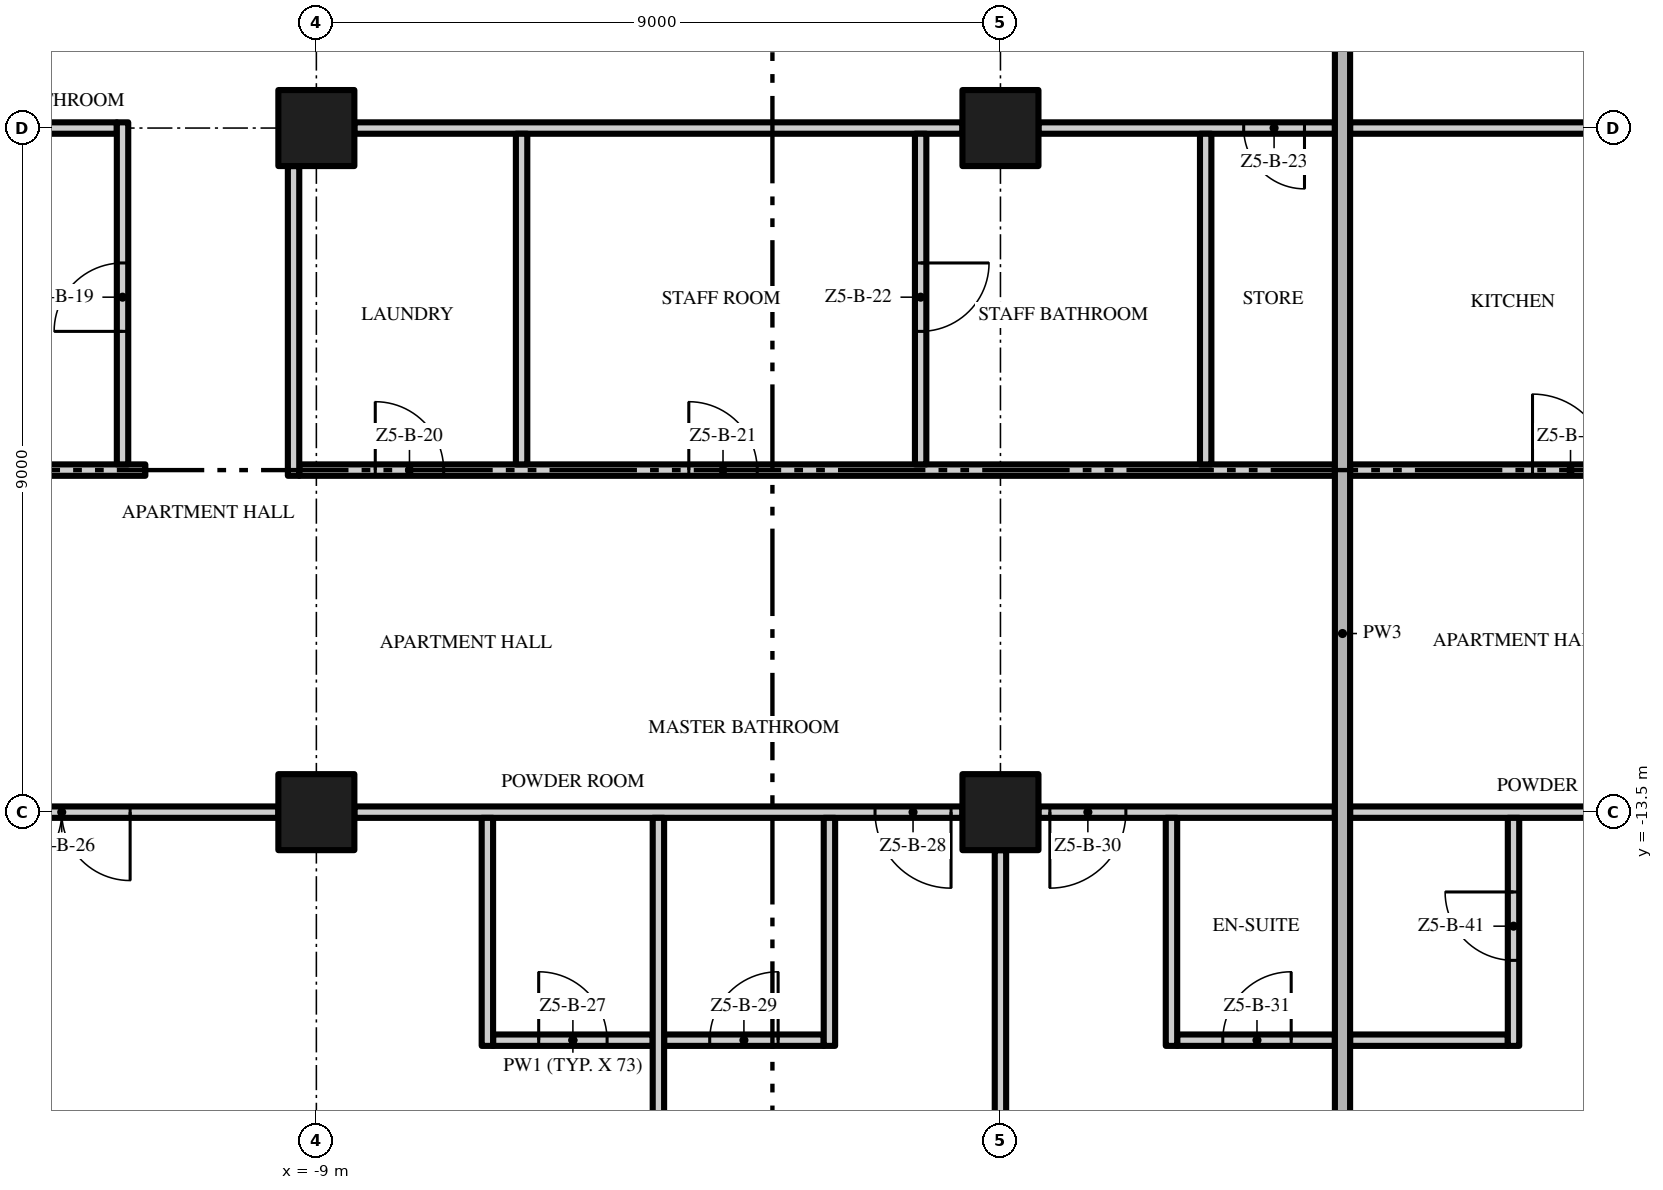
"""IFC4 building model, lengths in metres.
Left out: names, types, materials, properties, quantities, classifications, styles, units other than length and angle.
Written with IfcOpenShell. Run it as: python <this file> out.ifc"""

import sys

from ifc_helpers import new_model, si_unit, direction, frame, frame_2d, origin, origin_2d, place, context, subcontext, project, spatial, rectangle, extrude, element, fill, save


model = new_model("IFC4")
c1 = context("Model", 3, precision=1e-05, world=origin(), true_north=direction((0.0, 1.0)))
c2 = subcontext(c1, "Body", "Model", "MODEL_VIEW")
j1 = project(units=[si_unit("LENGTHUNIT", "METRE"), si_unit("PLANEANGLEUNIT", "RADIAN")], contexts=[c1])
p1 = place(None, origin())
s1 = spatial("IfcSite", under=j1, at=p1, CompositionType="ELEMENT")
p2 = place(p1, origin())
s2 = spatial("IfcBuilding", under=s1, at=p2, CompositionType="ELEMENT")
p3 = place(p2, frame((0.0, 0.0, 254.0)))
s3 = spatial("IfcBuildingStorey", under=s2, at=p3, CompositionType="ELEMENT", Elevation=254.0)
for number, where, z_axis, x_axis in (
    (1, (-9.0, -13.5, 0.0), (0.0, 0.0, 1.0), (1.0, 0.0, 0.0)),
    (2, (-9.0, -4.5, 0.0), (0.0, 0.0, 1.0), (1.0, 0.0, 0.0)),
    (3, (0.0, -13.5, 0.0), (0.0, 0.0, 1.0), (1.0, 0.0, 0.0)),
    (4, (0.0, -4.5, 0.0), (0.0, 0.0, 1.0), (1.0, 0.0, 0.0)),
):
    element("IfcColumn", number, at=place(p3, frame(where, z_axis=z_axis, x_axis=x_axis)), inside=s3, PredefinedType="COLUMN", context=c2, shape_type="SweptSolid", body=[
        extrude(rectangle(XDim=1.0, YDim=1.0, at=origin_2d()), origin(), (0.0, 0.0, 1.0), 3.5),
    ])
p4 = place(p3, frame((-6.675, -16.5, 0.0), z_axis=(0.0, 0.0, 1.0), x_axis=(1.0, 0.0, 0.0)))
e5 = element("IfcWall", 5, at=p4, inside=s3, PredefinedType="PARTITIONING", context=c2, shape_type="SweptSolid", body=[
    extrude(rectangle(XDim=2.1, YDim=0.15, at=frame_2d((1.05, 0.0))), origin(), (0.0, 0.0, 1.0), 3.5),
])
p5 = place(p4, frame((0.6, 0.0, 0.0)))
e6 = element("IfcOpeningElement", 6, at=p5, cuts=e5, PredefinedType="OPENING", context=c2, shape_type="SweptSolid", body=[
    extrude(rectangle(XDim=0.9, YDim=2.1, at=frame_2d((0.45, 1.05))), frame((0.0, 0.085, 0.0), z_axis=(0.0, -1.0, 0.0), x_axis=(1.0, 0.0, 0.0)), (0.0, 0.0, 1.0), 0.17),
])
p6 = place(p3, frame((-4.425, -16.5, 0.0), z_axis=(0.0, 0.0, 1.0), x_axis=(1.0, 0.0, 0.0)))
e7 = element("IfcWall", 7, at=p6, inside=s3, PredefinedType="PARTITIONING", context=c2, shape_type="SweptSolid", body=[
    extrude(rectangle(XDim=2.1, YDim=0.15, at=frame_2d((1.05, 0.0))), origin(), (0.0, 0.0, 1.0), 3.5),
])
p7 = place(p6, frame((0.6, 0.0, 0.0)))
e8 = element("IfcOpeningElement", 8, at=p7, cuts=e7, PredefinedType="OPENING", context=c2, shape_type="SweptSolid", body=[
    extrude(rectangle(XDim=0.9, YDim=2.1, at=frame_2d((0.45, 1.05))), frame((0.0, 0.085, 0.0), z_axis=(0.0, -1.0, 0.0), x_axis=(1.0, 0.0, 0.0)), (0.0, 0.0, 1.0), 0.17),
])
p8 = place(p3, frame((2.325, -16.5, 0.0), z_axis=(0.0, 0.0, 1.0), x_axis=(1.0, 0.0, 0.0)))
e9 = element("IfcWall", 9, at=p8, inside=s3, PredefinedType="PARTITIONING", context=c2, shape_type="SweptSolid", body=[
    extrude(rectangle(XDim=2.075, YDim=0.15, at=frame_2d((1.038, 0.0))), origin(), (0.0, 0.0, 1.0), 3.5),
])
p9 = place(p8, frame((0.6, 0.0, 0.0)))
e10 = element("IfcOpeningElement", 10, at=p9, cuts=e9, PredefinedType="OPENING", context=c2, shape_type="SweptSolid", body=[
    extrude(rectangle(XDim=0.9, YDim=2.1, at=frame_2d((0.45, 1.05))), frame((0.0, 0.085, 0.0), z_axis=(0.0, -1.0, 0.0), x_axis=(1.0, 0.0, 0.0)), (0.0, 0.0, 1.0), 0.17),
])
p10 = place(p3, frame((4.6, -16.5, 0.0), z_axis=(0.0, 0.0, 1.0), x_axis=(1.0, 0.0, 0.0)))
e11 = element("IfcWall", 11, at=p10, inside=s3, PredefinedType="PARTITIONING", context=c2, shape_type="SweptSolid", body=[
    extrude(rectangle(XDim=2.075, YDim=0.15, at=frame_2d((1.038, 0.0))), origin(), (0.0, 0.0, 1.0), 3.5),
])
p11 = place(p3, frame((-9.5, -13.5, 0.0), z_axis=(0.0, 0.0, 1.0), x_axis=(-1.0, 0.0, 0.0)))
e12 = element("IfcWall", 12, at=p11, inside=s3, PredefinedType="PARTITIONING", context=c2, shape_type="SweptSolid", body=[
    extrude(rectangle(XDim=8.0, YDim=0.15, at=frame_2d((4.0, 0.0))), origin(), (0.0, 0.0, 1.0), 3.5),
])
p12 = place(p11, frame((1.95, 0.0, 0.0)))
e13 = element("IfcOpeningElement", 13, at=p12, cuts=e12, PredefinedType="OPENING", context=c2, shape_type="SweptSolid", body=[
    extrude(rectangle(XDim=1.8, YDim=2.4, at=frame_2d((0.9, 1.2))), frame((0.0, 0.085, 0.0), z_axis=(0.0, -1.0, 0.0), x_axis=(1.0, 0.0, 0.0)), (0.0, 0.0, 1.0), 0.17),
])
p13 = place(p3, frame((-0.5, -13.5, 0.0), z_axis=(0.0, 0.0, 1.0), x_axis=(-1.0, 0.0, 0.0)))
e14 = element("IfcWall", 14, at=p13, inside=s3, PredefinedType="PARTITIONING", context=c2, shape_type="SweptSolid", body=[
    extrude(rectangle(XDim=8.0, YDim=0.15, at=frame_2d((4.0, 0.0))), origin(), (0.0, 0.0, 1.0), 3.5),
])
p14 = place(p13, frame((0.15, 0.0, 0.0)))
e15 = element("IfcOpeningElement", 15, at=p14, cuts=e14, PredefinedType="OPENING", context=c2, shape_type="SweptSolid", body=[
    extrude(rectangle(XDim=1.0, YDim=2.4, at=frame_2d((0.5, 1.2))), frame((0.0, 0.085, 0.0), z_axis=(0.0, -1.0, 0.0), x_axis=(1.0, 0.0, 0.0)), (0.0, 0.0, 1.0), 0.17),
])
p15 = place(p3, frame((4.4, -13.5, 0.0), z_axis=(0.0, 0.0, 1.0), x_axis=(-1.0, 0.0, 0.0)))
e16 = element("IfcWall", 16, at=p15, inside=s3, PredefinedType="PARTITIONING", context=c2, shape_type="SweptSolid", body=[
    extrude(rectangle(XDim=3.9, YDim=0.15, at=frame_2d((1.95, 0.0))), origin(), (0.0, 0.0, 1.0), 3.5),
])
p16 = place(p15, frame((2.75, 0.0, 0.0)))
e17 = element("IfcOpeningElement", 17, at=p16, cuts=e16, PredefinedType="OPENING", context=c2, shape_type="SweptSolid", body=[
    extrude(rectangle(XDim=1.0, YDim=2.4, at=frame_2d((0.5, 1.2))), frame((0.0, 0.085, 0.0), z_axis=(0.0, -1.0, 0.0), x_axis=(1.0, 0.0, 0.0)), (0.0, 0.0, 1.0), 0.17),
])
p17 = place(p3, frame((4.6, -13.5, 0.0), z_axis=(0.0, 0.0, 1.0), x_axis=(1.0, 0.0, 0.0)))
e18 = element("IfcWall", 18, at=p17, inside=s3, PredefinedType="PARTITIONING", context=c2, shape_type="SweptSolid", body=[
    extrude(rectangle(XDim=3.9, YDim=0.15, at=frame_2d((1.95, 0.0))), origin(), (0.0, 0.0, 1.0), 3.5),
])
p18 = place(p3, frame((-26.7, -9.0, 0.0), z_axis=(0.0, 0.0, 1.0), x_axis=(1.0, 0.0, 0.0)))
e19 = element("IfcWall", 19, at=p18, inside=s3, PredefinedType="PARTITIONING", context=c2, shape_type="SweptSolid", body=[
    extrude(rectangle(XDim=15.45, YDim=0.15, at=frame_2d((7.725, 0.0))), origin(), (0.0, 0.0, 1.0), 3.5),
])
p19 = place(p18, frame((9.4, 0.0, 0.0)))
e20 = element("IfcOpeningElement", 20, at=p19, cuts=e19, PredefinedType="OPENING", context=c2, shape_type="SweptSolid", body=[
    extrude(rectangle(XDim=1.0, YDim=2.4, at=frame_2d((0.5, 1.2))), frame((0.0, 0.085, 0.0), z_axis=(0.0, -1.0, 0.0), x_axis=(1.0, 0.0, 0.0)), (0.0, 0.0, 1.0), 0.17),
])
p20 = place(p3, frame((-9.225, -9.0, 0.0), z_axis=(0.0, 0.0, 1.0), x_axis=(1.0, 0.0, 0.0)))
e21 = element("IfcWall", 21, at=p20, inside=s3, PredefinedType="PARTITIONING", context=c2, shape_type="SweptSolid", body=[
    extrude(rectangle(XDim=13.625, YDim=0.15, at=frame_2d((6.812, 0.0))), origin(), (0.0, 0.0, 1.0), 3.5),
])
p21 = place(p20, frame((1.0, 0.0, 0.0)))
e22 = element("IfcOpeningElement", 22, at=p21, cuts=e21, PredefinedType="OPENING", context=c2, shape_type="SweptSolid", body=[
    extrude(rectangle(XDim=0.9, YDim=2.1, at=frame_2d((0.45, 1.05))), frame((0.0, 0.085, 0.0), z_axis=(0.0, -1.0, 0.0), x_axis=(1.0, 0.0, 0.0)), (0.0, 0.0, 1.0), 0.17),
])
p22 = place(p20, frame((5.125, 0.0, 0.0)))
e23 = element("IfcOpeningElement", 23, at=p22, cuts=e21, PredefinedType="OPENING", context=c2, shape_type="SweptSolid", body=[
    extrude(rectangle(XDim=0.9, YDim=2.1, at=frame_2d((0.45, 1.05))), frame((0.0, 0.085, 0.0), z_axis=(0.0, -1.0, 0.0), x_axis=(1.0, 0.0, 0.0)), (0.0, 0.0, 1.0), 0.17),
])
p23 = place(p3, frame((4.6, -9.0, 0.0), z_axis=(0.0, 0.0, 1.0), x_axis=(1.0, 0.0, 0.0)))
e24 = element("IfcWall", 24, at=p23, inside=s3, PredefinedType="PARTITIONING", context=c2, shape_type="SweptSolid", body=[
    extrude(rectangle(XDim=8.075, YDim=0.15, at=frame_2d((4.037, 0.0))), origin(), (0.0, 0.0, 1.0), 3.5),
])
p24 = place(p23, frame((2.4, 0.0, 0.0)))
e25 = element("IfcOpeningElement", 25, at=p24, cuts=e24, PredefinedType="OPENING", context=c2, shape_type="SweptSolid", body=[
    extrude(rectangle(XDim=1.0, YDim=2.4, at=frame_2d((0.5, 1.2))), frame((0.0, 0.085, 0.0), z_axis=(0.0, -1.0, 0.0), x_axis=(1.0, 0.0, 0.0)), (0.0, 0.0, 1.0), 0.17),
])
p25 = place(p3, frame((-17.5, -4.5, 0.0), z_axis=(0.0, 0.0, 1.0), x_axis=(1.0, 0.0, 0.0)))
e26 = element("IfcWall", 26, at=p25, inside=s3, PredefinedType="PARTITIONING", context=c2, shape_type="SweptSolid", body=[
    extrude(rectangle(XDim=5.875, YDim=0.15, at=frame_2d((2.938, 0.0))), origin(), (0.0, 0.0, 1.0), 3.5),
])
p26 = place(p3, frame((-8.5, -4.5, 0.0), z_axis=(0.0, 0.0, 1.0), x_axis=(1.0, 0.0, 0.0)))
e27 = element("IfcWall", 27, at=p26, inside=s3, PredefinedType="PARTITIONING", context=c2, shape_type="SweptSolid", body=[
    extrude(rectangle(XDim=8.0, YDim=0.15, at=frame_2d((4.0, 0.0))), origin(), (0.0, 0.0, 1.0), 3.5),
])
p27 = place(p3, frame((4.4, -4.5, 0.0), z_axis=(0.0, 0.0, 1.0), x_axis=(-1.0, 0.0, 0.0)))
e28 = element("IfcWall", 28, at=p27, inside=s3, PredefinedType="PARTITIONING", context=c2, shape_type="SweptSolid", body=[
    extrude(rectangle(XDim=3.9, YDim=0.15, at=frame_2d((1.95, 0.0))), origin(), (0.0, 0.0, 1.0), 3.5),
])
p28 = place(p27, frame((0.4, 0.0, 0.0)))
e29 = element("IfcOpeningElement", 29, at=p28, cuts=e28, PredefinedType="OPENING", context=c2, shape_type="SweptSolid", body=[
    extrude(rectangle(XDim=0.8, YDim=2.0, at=frame_2d((0.4, 1.0))), frame((0.0, 0.085, 0.0), z_axis=(0.0, -1.0, 0.0), x_axis=(1.0, 0.0, 0.0)), (0.0, 0.0, 1.0), 0.17),
])
p29 = place(p3, frame((4.6, -4.5, 0.0), z_axis=(0.0, 0.0, 1.0), x_axis=(1.0, 0.0, 0.0)))
e30 = element("IfcWall", 30, at=p29, inside=s3, PredefinedType="PARTITIONING", context=c2, shape_type="SweptSolid", body=[
    extrude(rectangle(XDim=3.9, YDim=0.15, at=frame_2d((1.95, 0.0))), origin(), (0.0, 0.0, 1.0), 3.5),
])
p30 = place(p3, frame((-11.55, -8.925, 0.0), z_axis=(0.0, 0.0, 1.0), x_axis=(0.0, 1.0, 0.0)))
e31 = element("IfcWall", 31, at=p30, inside=s3, PredefinedType="PARTITIONING", context=c2, shape_type="SweptSolid", body=[
    extrude(rectangle(XDim=4.5, YDim=0.15, at=frame_2d((2.25, 0.0))), origin(), (0.0, 0.0, 1.0), 3.5),
])
p31 = place(p30, frame((1.75, 0.0, 0.0)))
e32 = element("IfcOpeningElement", 32, at=p31, cuts=e31, PredefinedType="OPENING", context=c2, shape_type="SweptSolid", body=[
    extrude(rectangle(XDim=0.9, YDim=2.1, at=frame_2d((0.45, 1.05))), frame((0.0, 0.085, 0.0), z_axis=(0.0, -1.0, 0.0), x_axis=(1.0, 0.0, 0.0)), (0.0, 0.0, 1.0), 0.17),
])
p32 = place(p3, frame((-9.3, -9.075, 0.0), z_axis=(0.0, 0.0, 1.0), x_axis=(0.0, 1.0, 0.0)))
e33 = element("IfcWall", 33, at=p32, inside=s3, PredefinedType="PARTITIONING", context=c2, shape_type="SweptSolid", body=[
    extrude(rectangle(XDim=4.075, YDim=0.15, at=frame_2d((2.038, 0.0))), origin(), (0.0, 0.0, 1.0), 3.5),
])
p33 = place(p3, frame((-6.75, -16.575, 0.0), z_axis=(0.0, 0.0, 1.0), x_axis=(0.0, 1.0, 0.0)))
e34 = element("IfcWall", 34, at=p33, inside=s3, PredefinedType="PARTITIONING", context=c2, shape_type="SweptSolid", body=[
    extrude(rectangle(XDim=3.0, YDim=0.15, at=frame_2d((1.5, 0.0))), origin(), (0.0, 0.0, 1.0), 3.5),
])
p34 = place(p3, frame((-6.3, -8.925, 0.0), z_axis=(0.0, 0.0, 1.0), x_axis=(0.0, 1.0, 0.0)))
e35 = element("IfcWall", 35, at=p34, inside=s3, PredefinedType="PARTITIONING", context=c2, shape_type="SweptSolid", body=[
    extrude(rectangle(XDim=4.35, YDim=0.15, at=frame_2d((2.175, 0.0))), origin(), (0.0, 0.0, 1.0), 3.5),
])
p35 = place(p3, frame((-4.5, -22.2, 0.0), z_axis=(0.0, 0.0, 1.0), x_axis=(0.0, 1.0, 0.0)))
e36 = element("IfcWall", 36, at=p35, inside=s3, PredefinedType="PARTITIONING", context=c2, shape_type="SweptSolid", body=[
    extrude(rectangle(XDim=8.625, YDim=0.15, at=frame_2d((4.312, 0.0))), origin(), (0.0, 0.0, 1.0), 3.5),
])
p36 = place(p3, frame((-2.25, -16.575, 0.0), z_axis=(0.0, 0.0, 1.0), x_axis=(0.0, 1.0, 0.0)))
e37 = element("IfcWall", 37, at=p36, inside=s3, PredefinedType="PARTITIONING", context=c2, shape_type="SweptSolid", body=[
    extrude(rectangle(XDim=3.0, YDim=0.15, at=frame_2d((1.5, 0.0))), origin(), (0.0, 0.0, 1.0), 3.5),
])
p37 = place(p3, frame((-1.05, -4.575, 0.0), z_axis=(0.0, 0.0, 1.0), x_axis=(0.0, -1.0, 0.0)))
e38 = element("IfcWall", 38, at=p37, inside=s3, PredefinedType="PARTITIONING", context=c2, shape_type="SweptSolid", body=[
    extrude(rectangle(XDim=4.35, YDim=0.15, at=frame_2d((2.175, 0.0))), origin(), (0.0, 0.0, 1.0), 3.5),
])
p38 = place(p37, frame((1.7, 0.0, 0.0)))
e39 = element("IfcOpeningElement", 39, at=p38, cuts=e38, PredefinedType="OPENING", context=c2, shape_type="SweptSolid", body=[
    extrude(rectangle(XDim=0.9, YDim=2.1, at=frame_2d((0.45, 1.05))), frame((0.0, 0.085, 0.0), z_axis=(0.0, -1.0, 0.0), x_axis=(1.0, 0.0, 0.0)), (0.0, 0.0, 1.0), 0.17),
])
p39 = place(p3, frame((0.0, -21.6, 0.0), z_axis=(0.0, 0.0, 1.0), x_axis=(0.0, 1.0, 0.0)))
e40 = element("IfcWall", 40, at=p39, inside=s3, PredefinedType="PARTITIONING", context=c2, shape_type="SweptSolid", body=[
    extrude(rectangle(XDim=7.6, YDim=0.15, at=frame_2d((3.8, 0.0))), origin(), (0.0, 0.0, 1.0), 3.5),
])
p40 = place(p3, frame((2.25, -16.575, 0.0), z_axis=(0.0, 0.0, 1.0), x_axis=(0.0, 1.0, 0.0)))
e41 = element("IfcWall", 41, at=p40, inside=s3, PredefinedType="PARTITIONING", context=c2, shape_type="SweptSolid", body=[
    extrude(rectangle(XDim=3.0, YDim=0.15, at=frame_2d((1.5, 0.0))), origin(), (0.0, 0.0, 1.0), 3.5),
])
p41 = place(p3, frame((2.7, -8.925, 0.0), z_axis=(0.0, 0.0, 1.0), x_axis=(0.0, 1.0, 0.0)))
e42 = element("IfcWall", 42, at=p41, inside=s3, PredefinedType="PARTITIONING", context=c2, shape_type="SweptSolid", body=[
    extrude(rectangle(XDim=4.35, YDim=0.15, at=frame_2d((2.175, 0.0))), origin(), (0.0, 0.0, 1.0), 3.5),
])
p42 = place(p3, frame((4.5, -22.2, 0.0), z_axis=(0.0, 0.0, 1.0), x_axis=(0.0, 1.0, 0.0)))
e43 = element("IfcWall", 43, at=p42, inside=s3, PredefinedType="PARTITIONING", context=c2, shape_type="SweptSolid", body=[
    extrude(rectangle(XDim=22.1, YDim=0.2, at=frame_2d((11.05, 0.0))), origin(), (0.0, 0.0, 1.0), 3.5),
])
p43 = place(p3, frame((6.75, -16.575, 0.0), z_axis=(0.0, 0.0, 1.0), x_axis=(0.0, 1.0, 0.0)))
e44 = element("IfcWall", 44, at=p43, inside=s3, PredefinedType="PARTITIONING", context=c2, shape_type="SweptSolid", body=[
    extrude(rectangle(XDim=3.0, YDim=0.15, at=frame_2d((1.5, 0.0))), origin(), (0.0, 0.0, 1.0), 3.5),
])
p44 = place(p43, frame((1.125, 0.0, 0.0)))
e45 = element("IfcOpeningElement", 45, at=p44, cuts=e44, PredefinedType="OPENING", context=c2, shape_type="SweptSolid", body=[
    extrude(rectangle(XDim=0.9, YDim=2.1, at=frame_2d((0.45, 1.05))), frame((0.0, 0.085, 0.0), z_axis=(0.0, -1.0, 0.0), x_axis=(1.0, 0.0, 0.0)), (0.0, 0.0, 1.0), 0.17),
])
p45 = place(p31, origin())
e46 = element("IfcDoor", 46, at=p45, inside=s3, OperationType="SINGLE_SWING_LEFT", PredefinedType="DOOR", context=c2, shape_type="SweptSolid", body=[
    extrude(rectangle(XDim=0.9, YDim=2.1, at=frame_2d((0.45, 1.05))), frame((0.0, 0.025, 0.0), z_axis=(0.0, -1.0, 0.0), x_axis=(1.0, 0.0, 0.0)), (0.0, 0.0, 1.0), 0.05),
])
fill(e32, e46)
p46 = place(p21, origin())
e47 = element("IfcDoor", 47, at=p46, inside=s3, OperationType="SINGLE_SWING_LEFT", PredefinedType="DOOR", context=c2, shape_type="SweptSolid", body=[
    extrude(rectangle(XDim=0.9, YDim=2.1, at=frame_2d((0.45, 1.05))), frame((0.0, 0.025, 0.0), z_axis=(0.0, -1.0, 0.0), x_axis=(1.0, 0.0, 0.0)), (0.0, 0.0, 1.0), 0.05),
])
fill(e22, e47)
p47 = place(p22, origin())
e48 = element("IfcDoor", 48, at=p47, inside=s3, OperationType="SINGLE_SWING_LEFT", PredefinedType="DOOR", context=c2, shape_type="SweptSolid", body=[
    extrude(rectangle(XDim=0.9, YDim=2.1, at=frame_2d((0.45, 1.05))), frame((0.0, 0.025, 0.0), z_axis=(0.0, -1.0, 0.0), x_axis=(1.0, 0.0, 0.0)), (0.0, 0.0, 1.0), 0.05),
])
fill(e23, e48)
p48 = place(p38, origin())
e49 = element("IfcDoor", 49, at=p48, inside=s3, OperationType="SINGLE_SWING_LEFT", PredefinedType="DOOR", context=c2, shape_type="SweptSolid", body=[
    extrude(rectangle(XDim=0.9, YDim=2.1, at=frame_2d((0.45, 1.05))), frame((0.0, 0.025, 0.0), z_axis=(0.0, -1.0, 0.0), x_axis=(1.0, 0.0, 0.0)), (0.0, 0.0, 1.0), 0.05),
])
fill(e39, e49)
p49 = place(p28, origin())
e50 = element("IfcDoor", 50, at=p49, inside=s3, OperationType="SINGLE_SWING_LEFT", PredefinedType="DOOR", context=c2, shape_type="SweptSolid", body=[
    extrude(rectangle(XDim=0.8, YDim=2.0, at=frame_2d((0.4, 1.0))), frame((0.0, 0.025, 0.0), z_axis=(0.0, -1.0, 0.0), x_axis=(1.0, 0.0, 0.0)), (0.0, 0.0, 1.0), 0.05),
])
fill(e29, e50)
p50 = place(p12, origin())
e51 = element("IfcDoor", 51, at=p50, inside=s3, OperationType="DOUBLE_DOOR_SINGLE_SWING", PredefinedType="DOOR", context=c2, shape_type="SweptSolid", body=[
    extrude(rectangle(XDim=1.8, YDim=2.4, at=frame_2d((0.9, 1.2))), frame((0.0, 0.025, 0.0), z_axis=(0.0, -1.0, 0.0), x_axis=(1.0, 0.0, 0.0)), (0.0, 0.0, 1.0), 0.05),
])
fill(e13, e51)
p51 = place(p5, origin())
e52 = element("IfcDoor", 52, at=p51, inside=s3, OperationType="SINGLE_SWING_LEFT", PredefinedType="DOOR", context=c2, shape_type="SweptSolid", body=[
    extrude(rectangle(XDim=0.9, YDim=2.1, at=frame_2d((0.45, 1.05))), frame((0.0, 0.025, 0.0), z_axis=(0.0, -1.0, 0.0), x_axis=(1.0, 0.0, 0.0)), (0.0, 0.0, 1.0), 0.05),
])
fill(e6, e52)
p52 = place(p14, origin())
e53 = element("IfcDoor", 53, at=p52, inside=s3, OperationType="SINGLE_SWING_LEFT", PredefinedType="DOOR", context=c2, shape_type="SweptSolid", body=[
    extrude(rectangle(XDim=1.0, YDim=2.4, at=frame_2d((0.5, 1.2))), frame((0.0, 0.025, 0.0), z_axis=(0.0, -1.0, 0.0), x_axis=(1.0, 0.0, 0.0)), (0.0, 0.0, 1.0), 0.05),
])
fill(e15, e53)
p53 = place(p7, origin())
e54 = element("IfcDoor", 54, at=p53, inside=s3, OperationType="SINGLE_SWING_RIGHT", PredefinedType="DOOR", context=c2, shape_type="SweptSolid", body=[
    extrude(rectangle(XDim=0.9, YDim=2.1, at=frame_2d((0.45, 1.05))), frame((0.0, 0.025, 0.0), z_axis=(0.0, -1.0, 0.0), x_axis=(1.0, 0.0, 0.0)), (0.0, 0.0, 1.0), 0.05),
])
fill(e8, e54)
p54 = place(p16, origin())
e55 = element("IfcDoor", 55, at=p54, inside=s3, OperationType="SINGLE_SWING_RIGHT", PredefinedType="DOOR", context=c2, shape_type="SweptSolid", body=[
    extrude(rectangle(XDim=1.0, YDim=2.4, at=frame_2d((0.5, 1.2))), frame((0.0, 0.025, 0.0), z_axis=(0.0, -1.0, 0.0), x_axis=(1.0, 0.0, 0.0)), (0.0, 0.0, 1.0), 0.05),
])
fill(e17, e55)
p55 = place(p9, origin())
e56 = element("IfcDoor", 56, at=p55, inside=s3, OperationType="SINGLE_SWING_RIGHT", PredefinedType="DOOR", context=c2, shape_type="SweptSolid", body=[
    extrude(rectangle(XDim=0.9, YDim=2.1, at=frame_2d((0.45, 1.05))), frame((0.0, 0.025, 0.0), z_axis=(0.0, -1.0, 0.0), x_axis=(1.0, 0.0, 0.0)), (0.0, 0.0, 1.0), 0.05),
])
fill(e10, e56)
p56 = place(p24, origin())
e57 = element("IfcDoor", 57, at=p56, inside=s3, OperationType="SINGLE_SWING_LEFT", PredefinedType="DOOR", context=c2, shape_type="SweptSolid", body=[
    extrude(rectangle(XDim=1.0, YDim=2.4, at=frame_2d((0.5, 1.2))), frame((0.0, 0.025, 0.0), z_axis=(0.0, -1.0, 0.0), x_axis=(1.0, 0.0, 0.0)), (0.0, 0.0, 1.0), 0.05),
])
fill(e25, e57)
p57 = place(p44, origin())
e58 = element("IfcDoor", 58, at=p57, inside=s3, OperationType="SINGLE_SWING_RIGHT", PredefinedType="DOOR", context=c2, shape_type="SweptSolid", body=[
    extrude(rectangle(XDim=0.9, YDim=2.1, at=frame_2d((0.45, 1.05))), frame((0.0, 0.025, 0.0), z_axis=(0.0, -1.0, 0.0), x_axis=(1.0, 0.0, 0.0)), (0.0, 0.0, 1.0), 0.05),
])
fill(e45, e58)
save(model, sys.argv[1])
